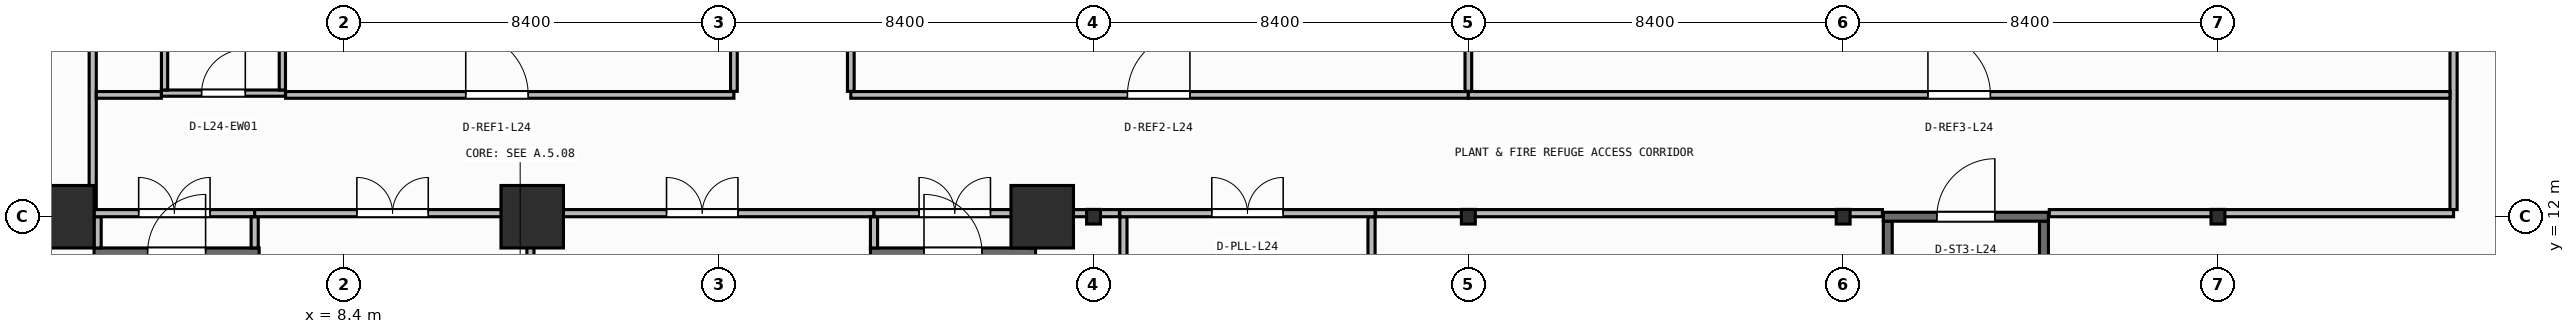
"""IFC4 building model, lengths in metres.
Left out: names, types, materials, properties, quantities, classifications, styles, units other than length and angle.
Written with IfcOpenShell. Run it as: python <this file> out.ifc"""

import sys

from ifc_helpers import new_model, si_unit, direction, frame, frame_2d, origin, origin_2d, place, context, subcontext, project, spatial, rectangle, i_section, extrude, element, fill, save


model = new_model("IFC4")
c1 = context("Model", 3, precision=1e-05, world=origin(), true_north=direction((0.0, 1.0)))
c2 = subcontext(c1, "Body", "Model", "MODEL_VIEW")
j1 = project(units=[si_unit("LENGTHUNIT", "METRE"), si_unit("PLANEANGLEUNIT", "RADIAN")], contexts=[c1])
p1 = place(None, origin())
s1 = spatial("IfcSite", under=j1, at=p1, CompositionType="ELEMENT")
p2 = place(p1, origin())
s2 = spatial("IfcBuilding", under=s1, at=p2, CompositionType="ELEMENT")
p3 = place(p2, frame((0.0, 0.0, 97.55)))
s3 = spatial("IfcBuildingStorey", under=s2, at=p3, CompositionType="ELEMENT", Elevation=97.55)
for number, where, z_axis, x_axis in (
    (1, (2.1, 12.0, 0.0), (0.0, 0.0, 1.0), (1.0, 0.0, 0.0)),
    (2, (12.62, 12.0, 0.0), (0.0, 0.0, 1.0), (1.0, 0.0, 0.0)),
    (3, (24.05, 12.0, 0.0), (0.0, 0.0, 1.0), (1.0, 0.0, 0.0)),
):
    element("IfcColumn", number, at=place(p3, frame(where, z_axis=z_axis, x_axis=x_axis)), inside=s3, PredefinedType="COLUMN", context=c2, shape_type="SweptSolid", body=[
        extrude(rectangle(XDim=1.4, YDim=1.4, at=origin_2d()), origin(), (0.0, 0.0, 1.0), 5.8),
    ])
for number, where, z_axis, x_axis in (
    (4, (25.2, 12.0, 0.0), (0.0, 0.0, 1.0), (1.0, 0.0, 0.0)),
    (5, (33.6, 12.0, 0.0), (0.0, 0.0, 1.0), (1.0, 0.0, 0.0)),
    (6, (42.0, 12.0, 0.0), (0.0, 0.0, 1.0), (1.0, 0.0, 0.0)),
    (7, (50.4, 12.0, 0.0), (0.0, 0.0, 1.0), (1.0, 0.0, 0.0)),
):
    element("IfcColumn", number, at=place(p3, frame(where, z_axis=z_axis, x_axis=x_axis)), inside=s3, PredefinedType="COLUMN", context=c2, shape_type="SweptSolid", body=[
        extrude(i_section(OverallWidth=0.311, OverallDepth=0.327, WebThickness=0.016, FlangeThickness=0.025, FilletRadius=0.017, at=origin_2d()), origin(), (0.0, 0.0, 1.0), 5.8),
    ])
p4 = place(p3, frame((2.8, 11.2, 0.0), z_axis=(0.0, 0.0, 1.0), x_axis=(1.0, 0.0, 0.0)))
e8 = element("IfcWall", 8, at=p4, inside=s3, PredefinedType="SHEAR", context=c2, shape_type="SweptSolid", body=[
    extrude(rectangle(XDim=3.7, YDim=0.2, at=frame_2d((1.85, 0.0))), origin(), (0.0, 0.0, 1.0), 5.56),
])
p5 = place(p4, frame((1.2, 0.0, 0.0)))
e9 = element("IfcOpeningElement", 9, at=p5, cuts=e8, PredefinedType="OPENING", context=c2, shape_type="SweptSolid", body=[
    extrude(rectangle(XDim=1.3, YDim=2.15, at=frame_2d((0.65, 1.075))), frame((0.0, 0.11, 0.0), z_axis=(0.0, -1.0, 0.0), x_axis=(1.0, 0.0, 0.0)), (0.0, 0.0, 1.0), 0.22),
])
p6 = place(p3, frame((20.2, 11.2, 0.0), z_axis=(0.0, 0.0, 1.0), x_axis=(1.0, 0.0, 0.0)))
e10 = element("IfcWall", 10, at=p6, inside=s3, PredefinedType="SHEAR", context=c2, shape_type="SweptSolid", body=[
    extrude(rectangle(XDim=3.7, YDim=0.2, at=frame_2d((1.85, 0.0))), origin(), (0.0, 0.0, 1.0), 5.56),
])
p7 = place(p6, frame((1.2, 0.0, 0.0)))
e11 = element("IfcOpeningElement", 11, at=p7, cuts=e10, PredefinedType="OPENING", context=c2, shape_type="SweptSolid", body=[
    extrude(rectangle(XDim=1.3, YDim=2.15, at=frame_2d((0.65, 1.075))), frame((0.0, 0.11, 0.0), z_axis=(0.0, -1.0, 0.0), x_axis=(1.0, 0.0, 0.0)), (0.0, 0.0, 1.0), 0.22),
])
for number, where, z_axis, x_axis in (
    (12, (43.0, 4.3, 0.0), (0.0, 0.0, 1.0), (0.0, 1.0, 0.0)),
    (13, (46.5, 4.3, 0.0), (0.0, 0.0, 1.0), (0.0, 1.0, 0.0)),
):
    element("IfcWall", number, at=place(p3, frame(where, z_axis=z_axis, x_axis=x_axis)), inside=s3, PredefinedType="SHEAR", context=c2, shape_type="SweptSolid", body=[
        extrude(rectangle(XDim=7.6, YDim=0.2, at=frame_2d((3.8, 0.0))), origin(), (0.0, 0.0, 1.0), 5.56),
    ])
p8 = place(p3, frame((42.9, 12.0, 0.0), z_axis=(0.0, 0.0, 1.0), x_axis=(1.0, 0.0, 0.0)))
e14 = element("IfcWall", 14, at=p8, inside=s3, PredefinedType="SHEAR", context=c2, shape_type="SweptSolid", body=[
    extrude(rectangle(XDim=3.7, YDim=0.2, at=frame_2d((1.85, 0.0))), origin(), (0.0, 0.0, 1.0), 5.56),
])
p9 = place(p8, frame((1.2, 0.0, 0.0)))
e15 = element("IfcOpeningElement", 15, at=p9, cuts=e14, PredefinedType="OPENING", context=c2, shape_type="SweptSolid", body=[
    extrude(rectangle(XDim=1.3, YDim=2.15, at=frame_2d((0.65, 1.075))), frame((0.0, 0.11, 0.0), z_axis=(0.0, -1.0, 0.0), x_axis=(1.0, 0.0, 0.0)), (0.0, 0.0, 1.0), 0.22),
])
p10 = place(p3, frame((2.88, 11.3, 0.0), z_axis=(0.0, 0.0, 1.0), x_axis=(0.0, 1.0, 0.0)))
e16 = element("IfcWall", 16, at=p10, inside=s3, PredefinedType="PARTITIONING", context=c2, shape_type="SweptSolid", body=[
    extrude(rectangle(XDim=0.7, YDim=0.16, at=frame_2d((0.35, 0.0))), origin(), (0.0, 0.0, 1.0), 5.56),
])
p11 = place(p3, frame((2.8, 12.08, 0.0), z_axis=(0.0, 0.0, 1.0), x_axis=(1.0, 0.0, 0.0)))
e17 = element("IfcWall", 17, at=p11, inside=s3, PredefinedType="PARTITIONING", context=c2, shape_type="SweptSolid", body=[
    extrude(rectangle(XDim=3.6, YDim=0.16, at=frame_2d((1.8, 0.0))), origin(), (0.0, 0.0, 1.0), 4.835),
])
p12 = place(p11, frame((1.0, 0.0, 0.0)))
e18 = element("IfcOpeningElement", 18, at=p12, cuts=e17, PredefinedType="OPENING", context=c2, shape_type="SweptSolid", body=[
    extrude(rectangle(XDim=1.6, YDim=2.05, at=frame_2d((0.8, 1.025))), frame((0.0, 0.09, 0.0), z_axis=(0.0, -1.0, 0.0), x_axis=(1.0, 0.0, 0.0)), (0.0, 0.0, 1.0), 0.18),
])
p13 = place(p3, frame((6.4, 11.3, 0.0), z_axis=(0.0, 0.0, 1.0), x_axis=(0.0, 1.0, 0.0)))
e19 = element("IfcWall", 19, at=p13, inside=s3, PredefinedType="PARTITIONING", context=c2, shape_type="SweptSolid", body=[
    extrude(rectangle(XDim=0.7, YDim=0.16, at=frame_2d((0.35, 0.0))), origin(), (0.0, 0.0, 1.0), 5.56),
])
p14 = place(p3, frame((6.4, 12.08, 0.0), z_axis=(0.0, 0.0, 1.0), x_axis=(1.0, 0.0, 0.0)))
e20 = element("IfcWall", 20, at=p14, inside=s3, PredefinedType="PARTITIONING", context=c2, shape_type="SweptSolid", body=[
    extrude(rectangle(XDim=6.18, YDim=0.16, at=frame_2d((3.09, 0.0))), origin(), (0.0, 0.0, 1.0), 4.835),
])
p15 = place(p14, frame((2.29, 0.0, 0.0)))
e21 = element("IfcOpeningElement", 21, at=p15, cuts=e20, PredefinedType="OPENING", context=c2, shape_type="SweptSolid", body=[
    extrude(rectangle(XDim=1.6, YDim=2.05, at=frame_2d((0.8, 1.025))), frame((0.0, 0.09, 0.0), z_axis=(0.0, -1.0, 0.0), x_axis=(1.0, 0.0, 0.0)), (0.0, 0.0, 1.0), 0.18),
])
p16 = place(p3, frame((12.58, 9.21, 0.0), z_axis=(0.0, 0.0, 1.0), x_axis=(0.0, 1.0, 0.0)))
e22 = element("IfcWall", 22, at=p16, inside=s3, PredefinedType="PARTITIONING", context=c2, shape_type="SweptSolid", body=[
    extrude(rectangle(XDim=2.79, YDim=0.16, at=frame_2d((1.395, 0.0))), origin(), (0.0, 0.0, 1.0), 5.56),
])
p17 = place(p3, frame((12.58, 12.08, 0.0), z_axis=(0.0, 0.0, 1.0), x_axis=(1.0, 0.0, 0.0)))
e23 = element("IfcWall", 23, at=p17, inside=s3, PredefinedType="PARTITIONING", context=c2, shape_type="SweptSolid", body=[
    extrude(rectangle(XDim=7.7, YDim=0.16, at=frame_2d((3.85, 0.0))), origin(), (0.0, 0.0, 1.0), 4.835),
])
p18 = place(p17, frame((3.05, 0.0, 0.0)))
e24 = element("IfcOpeningElement", 24, at=p18, cuts=e23, PredefinedType="OPENING", context=c2, shape_type="SweptSolid", body=[
    extrude(rectangle(XDim=1.6, YDim=2.05, at=frame_2d((0.8, 1.025))), frame((0.0, 0.09, 0.0), z_axis=(0.0, -1.0, 0.0), x_axis=(1.0, 0.0, 0.0)), (0.0, 0.0, 1.0), 0.18),
])
p19 = place(p3, frame((20.28, 11.3, 0.0), z_axis=(0.0, 0.0, 1.0), x_axis=(0.0, 1.0, 0.0)))
e25 = element("IfcWall", 25, at=p19, inside=s3, PredefinedType="PARTITIONING", context=c2, shape_type="SweptSolid", body=[
    extrude(rectangle(XDim=0.7, YDim=0.16, at=frame_2d((0.35, 0.0))), origin(), (0.0, 0.0, 1.0), 5.56),
])
p20 = place(p3, frame((20.28, 12.08, 0.0), z_axis=(0.0, 0.0, 1.0), x_axis=(1.0, 0.0, 0.0)))
e26 = element("IfcWall", 26, at=p20, inside=s3, PredefinedType="PARTITIONING", context=c2, shape_type="SweptSolid", body=[
    extrude(rectangle(XDim=3.62, YDim=0.16, at=frame_2d((1.81, 0.0))), origin(), (0.0, 0.0, 1.0), 4.835),
])
p21 = place(p20, frame((1.01, 0.0, 0.0)))
e27 = element("IfcOpeningElement", 27, at=p21, cuts=e26, PredefinedType="OPENING", context=c2, shape_type="SweptSolid", body=[
    extrude(rectangle(XDim=1.6, YDim=2.05, at=frame_2d((0.8, 1.025))), frame((0.0, 0.09, 0.0), z_axis=(0.0, -1.0, 0.0), x_axis=(1.0, 0.0, 0.0)), (0.0, 0.0, 1.0), 0.18),
])
p22 = place(p3, frame((23.82, 11.3, 0.0), z_axis=(0.0, 0.0, 1.0), x_axis=(0.0, 1.0, 0.0)))
e28 = element("IfcWall", 28, at=p22, inside=s3, PredefinedType="PARTITIONING", context=c2, shape_type="SweptSolid", body=[
    extrude(rectangle(XDim=0.7, YDim=0.16, at=frame_2d((0.35, 0.0))), origin(), (0.0, 0.0, 1.0), 5.56),
])
for number, where, z_axis, x_axis in (
    (29, (25.87, 8.61, 0.0), (0.0, 0.0, 1.0), (0.0, 1.0, 0.0)),
    (30, (31.43, 8.61, 0.0), (0.0, 0.0, 1.0), (0.0, 1.0, 0.0)),
):
    element("IfcWall", number, at=place(p3, frame(where, z_axis=z_axis, x_axis=x_axis)), inside=s3, PredefinedType="PARTITIONING", context=c2, shape_type="SweptSolid", body=[
        extrude(rectangle(XDim=3.39, YDim=0.16, at=frame_2d((1.695, 0.0))), origin(), (0.0, 0.0, 1.0), 5.56),
    ])
p23 = place(p3, frame((25.79, 12.08, 0.0), z_axis=(0.0, 0.0, 1.0), x_axis=(1.0, 0.0, 0.0)))
e31 = element("IfcWall", 31, at=p23, inside=s3, PredefinedType="PARTITIONING", context=c2, shape_type="SweptSolid", body=[
    extrude(rectangle(XDim=5.72, YDim=0.16, at=frame_2d((2.86, 0.0))), origin(), (0.0, 0.0, 1.0), 4.835),
])
p24 = place(p23, frame((2.06, 0.0, 0.0)))
e32 = element("IfcOpeningElement", 32, at=p24, cuts=e31, PredefinedType="OPENING", context=c2, shape_type="SweptSolid", body=[
    extrude(rectangle(XDim=1.6, YDim=2.05, at=frame_2d((0.8, 1.025))), frame((0.0, 0.09, 0.0), z_axis=(0.0, -1.0, 0.0), x_axis=(1.0, 0.0, 0.0)), (0.0, 0.0, 1.0), 0.18),
])
p25 = place(p3, frame((4.31, 14.77, 0.0), z_axis=(0.0, 0.0, 1.0), x_axis=(1.0, 0.0, 0.0)))
e33 = element("IfcWall", 33, at=p25, inside=s3, PredefinedType="PARTITIONING", context=c2, shape_type="SweptSolid", body=[
    extrude(rectangle(XDim=2.78, YDim=0.14, at=frame_2d((1.39, 0.0))), origin(), (0.0, 0.0, 1.0), 5.56),
])
p26 = place(p25, frame((0.9, 0.0, 0.0)))
e34 = element("IfcOpeningElement", 34, at=p26, cuts=e33, PredefinedType="OPENING", context=c2, shape_type="SweptSolid", body=[
    extrude(rectangle(XDim=0.98, YDim=2.1, at=frame_2d((0.49, 1.05))), frame((0.0, 0.08, 0.0), z_axis=(0.0, -1.0, 0.0), x_axis=(1.0, 0.0, 0.0)), (0.0, 0.0, 1.0), 0.16),
])
for number, where, z_axis, x_axis in (
    (35, (4.38, 14.84, 0.0), (0.0, 0.0, 1.0), (0.0, 1.0, 0.0)),
    (36, (7.02, 14.84, 0.0), (0.0, 0.0, 1.0), (0.0, 1.0, 0.0)),
):
    element("IfcWall", number, at=place(p3, frame(where, z_axis=z_axis, x_axis=x_axis)), inside=s3, PredefinedType="PARTITIONING", context=c2, shape_type="SweptSolid", body=[
        extrude(rectangle(XDim=2.2, YDim=0.14, at=frame_2d((1.1, 0.0))), origin(), (0.0, 0.0, 1.0), 5.56),
    ])
p27 = place(p3, frame((2.77, 12.16, 0.0), z_axis=(0.0, 0.0, 1.0), x_axis=(0.0, 1.0, 0.0)))
e37 = element("IfcWall", 37, at=p27, inside=s3, PredefinedType="PARTITIONING", context=c2, shape_type="SweptSolid", body=[
    extrude(rectangle(XDim=16.04, YDim=0.16, at=frame_2d((8.02, 0.0))), origin(), (0.0, 0.0, 1.0), 5.56),
])
p28 = place(p3, frame((55.68, 12.16, 0.0), z_axis=(0.0, 0.0, 1.0), x_axis=(0.0, 1.0, 0.0)))
e38 = element("IfcWall", 38, at=p28, inside=s3, PredefinedType="PARTITIONING", context=c2, shape_type="SweptSolid", body=[
    extrude(rectangle(XDim=6.44, YDim=0.16, at=frame_2d((3.22, 0.0))), origin(), (0.0, 0.0, 1.0), 5.56),
])
p29 = place(p3, frame((23.92, 12.08, 0.0), z_axis=(0.0, 0.0, 1.0), x_axis=(1.0, 0.0, 0.0)))
e39 = element("IfcWall", 39, at=p29, inside=s3, PredefinedType="PARTITIONING", context=c2, shape_type="SweptSolid", body=[
    extrude(rectangle(XDim=1.86, YDim=0.16, at=frame_2d((0.93, 0.0))), origin(), (0.0, 0.0, 1.0), 4.835),
])
p30 = place(p3, frame((31.52, 12.08, 0.0), z_axis=(0.0, 0.0, 1.0), x_axis=(1.0, 0.0, 0.0)))
e40 = element("IfcWall", 40, at=p30, inside=s3, PredefinedType="PARTITIONING", context=c2, shape_type="SweptSolid", body=[
    extrude(rectangle(XDim=11.36, YDim=0.16, at=frame_2d((5.68, 0.0))), origin(), (0.0, 0.0, 1.0), 4.835),
])
p31 = place(p3, frame((46.62, 12.08, 0.0), z_axis=(0.0, 0.0, 1.0), x_axis=(1.0, 0.0, 0.0)))
e41 = element("IfcWall", 41, at=p31, inside=s3, PredefinedType="PARTITIONING", context=c2, shape_type="SweptSolid", body=[
    extrude(rectangle(XDim=9.06, YDim=0.16, at=frame_2d((4.53, 0.0))), origin(), (0.0, 0.0, 1.0), 4.835),
])
p32 = place(p3, frame((2.85, 14.73, 0.0), z_axis=(0.0, 0.0, 1.0), x_axis=(1.0, 0.0, 0.0)))
e42 = element("IfcWall", 42, at=p32, inside=s3, PredefinedType="PARTITIONING", context=c2, shape_type="SweptSolid", body=[
    extrude(rectangle(XDim=1.458, YDim=0.15, at=frame_2d((0.729, 0.0))), origin(), (0.0, 0.0, 1.0), 5.56),
])
p33 = place(p3, frame((7.092, 14.73, 0.0), z_axis=(0.0, 0.0, 1.0), x_axis=(1.0, 0.0, 0.0)))
e43 = element("IfcWall", 43, at=p33, inside=s3, PredefinedType="PARTITIONING", context=c2, shape_type="SweptSolid", body=[
    extrude(rectangle(XDim=10.048, YDim=0.15, at=frame_2d((5.024, 0.0))), origin(), (0.0, 0.0, 1.0), 5.56),
])
p34 = place(p33, frame((4.038, 0.0, 0.0)))
e44 = element("IfcOpeningElement", 44, at=p34, cuts=e43, PredefinedType="OPENING", context=c2, shape_type="SweptSolid", body=[
    extrude(rectangle(XDim=1.4, YDim=2.15, at=frame_2d((0.7, 1.075))), frame((0.0, 0.085, 0.0), z_axis=(0.0, -1.0, 0.0), x_axis=(1.0, 0.0, 0.0)), (0.0, 0.0, 1.0), 0.17),
])
for number, where, z_axis, x_axis in (
    (45, (17.14, 14.81, 0.0), (0.0, 0.0, 1.0), (0.0, 1.0, 0.0)),
    (46, (19.76, 14.81, 0.0), (0.0, 0.0, 1.0), (0.0, 1.0, 0.0)),
):
    element("IfcWall", number, at=place(p3, frame(where, z_axis=z_axis, x_axis=x_axis)), inside=s3, PredefinedType="PARTITIONING", context=c2, shape_type="SweptSolid", body=[
        extrude(rectangle(XDim=3.79, YDim=0.15, at=frame_2d((1.895, 0.0))), origin(), (0.0, 0.0, 1.0), 5.56),
    ])
p35 = place(p3, frame((19.76, 14.73, 0.0), z_axis=(0.0, 0.0, 1.0), x_axis=(1.0, 0.0, 0.0)))
e47 = element("IfcWall", 47, at=p35, inside=s3, PredefinedType="PARTITIONING", context=c2, shape_type="SweptSolid", body=[
    extrude(rectangle(XDim=13.84, YDim=0.15, at=frame_2d((6.92, 0.0))), origin(), (0.0, 0.0, 1.0), 5.56),
])
p36 = place(p35, frame((6.2, 0.0, 0.0)))
e48 = element("IfcOpeningElement", 48, at=p36, cuts=e47, PredefinedType="OPENING", context=c2, shape_type="SweptSolid", body=[
    extrude(rectangle(XDim=1.4, YDim=2.15, at=frame_2d((0.7, 1.075))), frame((0.0, 0.085, 0.0), z_axis=(0.0, -1.0, 0.0), x_axis=(1.0, 0.0, 0.0)), (0.0, 0.0, 1.0), 0.17),
])
p37 = place(p3, frame((33.6, 14.81, 0.0), z_axis=(0.0, 0.0, 1.0), x_axis=(0.0, 1.0, 0.0)))
e49 = element("IfcWall", 49, at=p37, inside=s3, PredefinedType="PARTITIONING", context=c2, shape_type="SweptSolid", body=[
    extrude(rectangle(XDim=3.79, YDim=0.15, at=frame_2d((1.895, 0.0))), origin(), (0.0, 0.0, 1.0), 4.325),
])
p38 = place(p3, frame((33.6, 14.73, 0.0), z_axis=(0.0, 0.0, 1.0), x_axis=(1.0, 0.0, 0.0)))
e50 = element("IfcWall", 50, at=p38, inside=s3, PredefinedType="PARTITIONING", context=c2, shape_type="SweptSolid", body=[
    extrude(rectangle(XDim=22.0, YDim=0.15, at=frame_2d((11.0, 0.0))), origin(), (0.0, 0.0, 1.0), 5.56),
])
p39 = place(p38, frame((10.3, 0.0, 0.0)))
e51 = element("IfcOpeningElement", 51, at=p39, cuts=e50, PredefinedType="OPENING", context=c2, shape_type="SweptSolid", body=[
    extrude(rectangle(XDim=1.4, YDim=2.15, at=frame_2d((0.7, 1.075))), frame((0.0, 0.085, 0.0), z_axis=(0.0, -1.0, 0.0), x_axis=(1.0, 0.0, 0.0)), (0.0, 0.0, 1.0), 0.17),
])
p40 = place(p5, origin())
e52 = element("IfcDoor", 52, at=p40, inside=s3, OperationType="SINGLE_SWING_RIGHT", PredefinedType="DOOR", context=c2, shape_type="SweptSolid", body=[
    extrude(rectangle(XDim=1.3, YDim=2.15, at=frame_2d((0.65, 1.075))), frame((0.0, 0.025, 0.0), z_axis=(0.0, -1.0, 0.0), x_axis=(1.0, 0.0, 0.0)), (0.0, 0.0, 1.0), 0.05),
])
fill(e9, e52)
p41 = place(p7, origin())
e53 = element("IfcDoor", 53, at=p41, inside=s3, OperationType="SINGLE_SWING_LEFT", PredefinedType="DOOR", context=c2, shape_type="SweptSolid", body=[
    extrude(rectangle(XDim=1.3, YDim=2.15, at=frame_2d((0.65, 1.075))), frame((0.0, 0.025, 0.0), z_axis=(0.0, -1.0, 0.0), x_axis=(1.0, 0.0, 0.0)), (0.0, 0.0, 1.0), 0.05),
])
fill(e11, e53)
p42 = place(p9, origin())
e54 = element("IfcDoor", 54, at=p42, inside=s3, OperationType="SINGLE_SWING_RIGHT", PredefinedType="DOOR", context=c2, shape_type="SweptSolid", body=[
    extrude(rectangle(XDim=1.3, YDim=2.15, at=frame_2d((0.65, 1.075))), frame((0.0, 0.025, 0.0), z_axis=(0.0, -1.0, 0.0), x_axis=(1.0, 0.0, 0.0)), (0.0, 0.0, 1.0), 0.05),
])
fill(e15, e54)
p43 = place(p12, origin())
e55 = element("IfcDoor", 55, at=p43, inside=s3, OperationType="DOUBLE_DOOR_SINGLE_SWING", PredefinedType="DOOR", context=c2, shape_type="SweptSolid", body=[
    extrude(rectangle(XDim=1.6, YDim=2.05, at=frame_2d((0.8, 1.025))), frame((0.0, 0.025, 0.0), z_axis=(0.0, -1.0, 0.0), x_axis=(1.0, 0.0, 0.0)), (0.0, 0.0, 1.0), 0.05),
])
fill(e18, e55)
p44 = place(p15, origin())
e56 = element("IfcDoor", 56, at=p44, inside=s3, OperationType="DOUBLE_DOOR_SINGLE_SWING", PredefinedType="DOOR", context=c2, shape_type="SweptSolid", body=[
    extrude(rectangle(XDim=1.6, YDim=2.05, at=frame_2d((0.8, 1.025))), frame((0.0, 0.025, 0.0), z_axis=(0.0, -1.0, 0.0), x_axis=(1.0, 0.0, 0.0)), (0.0, 0.0, 1.0), 0.05),
])
fill(e21, e56)
p45 = place(p18, origin())
e57 = element("IfcDoor", 57, at=p45, inside=s3, OperationType="DOUBLE_DOOR_SINGLE_SWING", PredefinedType="DOOR", context=c2, shape_type="SweptSolid", body=[
    extrude(rectangle(XDim=1.6, YDim=2.05, at=frame_2d((0.8, 1.025))), frame((0.0, 0.025, 0.0), z_axis=(0.0, -1.0, 0.0), x_axis=(1.0, 0.0, 0.0)), (0.0, 0.0, 1.0), 0.05),
])
fill(e24, e57)
p46 = place(p21, origin())
e58 = element("IfcDoor", 58, at=p46, inside=s3, OperationType="DOUBLE_DOOR_SINGLE_SWING", PredefinedType="DOOR", context=c2, shape_type="SweptSolid", body=[
    extrude(rectangle(XDim=1.6, YDim=2.05, at=frame_2d((0.8, 1.025))), frame((0.0, 0.025, 0.0), z_axis=(0.0, -1.0, 0.0), x_axis=(1.0, 0.0, 0.0)), (0.0, 0.0, 1.0), 0.05),
])
fill(e27, e58)
p47 = place(p24, origin())
e59 = element("IfcDoor", 59, at=p47, inside=s3, OperationType="DOUBLE_DOOR_SINGLE_SWING", PredefinedType="DOOR", context=c2, shape_type="SweptSolid", body=[
    extrude(rectangle(XDim=1.6, YDim=2.05, at=frame_2d((0.8, 1.025))), frame((0.0, 0.025, 0.0), z_axis=(0.0, -1.0, 0.0), x_axis=(1.0, 0.0, 0.0)), (0.0, 0.0, 1.0), 0.05),
])
fill(e32, e59)
p48 = place(p26, origin())
e60 = element("IfcDoor", 60, at=p48, inside=s3, OperationType="SINGLE_SWING_RIGHT", PredefinedType="DOOR", context=c2, shape_type="SweptSolid", body=[
    extrude(rectangle(XDim=0.98, YDim=2.1, at=frame_2d((0.49, 1.05))), frame((0.0, 0.025, 0.0), z_axis=(0.0, -1.0, 0.0), x_axis=(1.0, 0.0, 0.0)), (0.0, 0.0, 1.0), 0.05),
])
fill(e34, e60)
p49 = place(p34, origin())
e61 = element("IfcDoor", 61, at=p49, inside=s3, OperationType="SINGLE_SWING_LEFT", PredefinedType="DOOR", context=c2, shape_type="SweptSolid", body=[
    extrude(rectangle(XDim=1.4, YDim=2.15, at=frame_2d((0.7, 1.075))), frame((0.0, 0.025, 0.0), z_axis=(0.0, -1.0, 0.0), x_axis=(1.0, 0.0, 0.0)), (0.0, 0.0, 1.0), 0.05),
])
fill(e44, e61)
p50 = place(p36, origin())
e62 = element("IfcDoor", 62, at=p50, inside=s3, OperationType="SINGLE_SWING_RIGHT", PredefinedType="DOOR", context=c2, shape_type="SweptSolid", body=[
    extrude(rectangle(XDim=1.4, YDim=2.15, at=frame_2d((0.7, 1.075))), frame((0.0, 0.025, 0.0), z_axis=(0.0, -1.0, 0.0), x_axis=(1.0, 0.0, 0.0)), (0.0, 0.0, 1.0), 0.05),
])
fill(e48, e62)
p51 = place(p39, origin())
e63 = element("IfcDoor", 63, at=p51, inside=s3, OperationType="SINGLE_SWING_LEFT", PredefinedType="DOOR", context=c2, shape_type="SweptSolid", body=[
    extrude(rectangle(XDim=1.4, YDim=2.15, at=frame_2d((0.7, 1.075))), frame((0.0, 0.025, 0.0), z_axis=(0.0, -1.0, 0.0), x_axis=(1.0, 0.0, 0.0)), (0.0, 0.0, 1.0), 0.05),
])
fill(e51, e63)
save(model, sys.argv[1])
